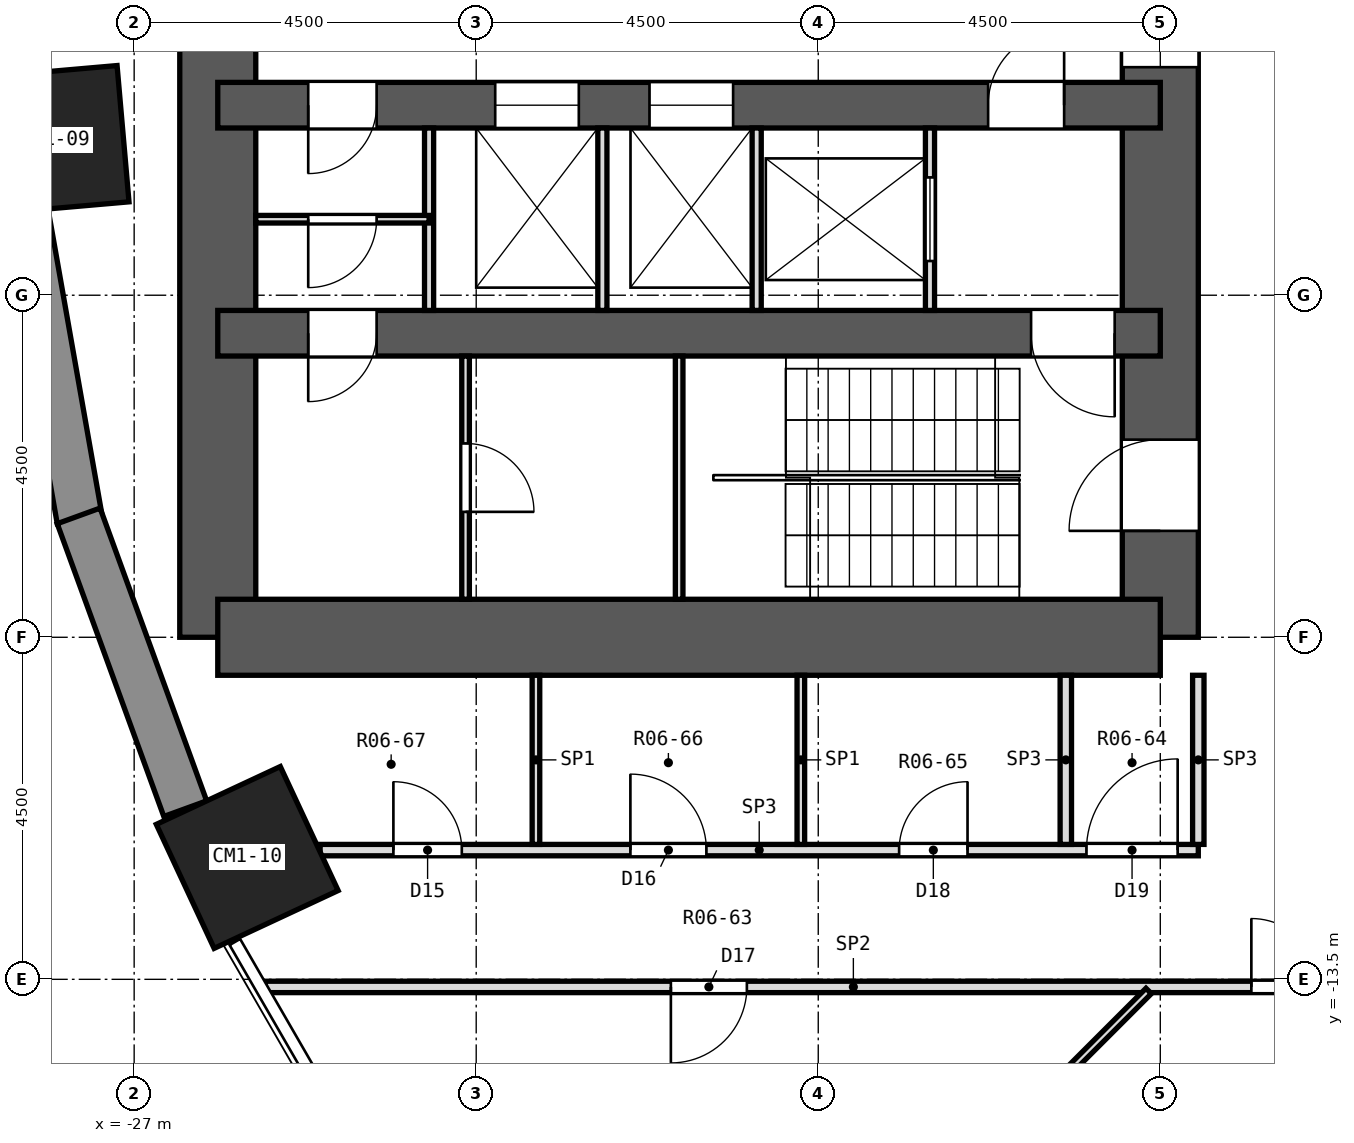
"""IFC4 building model, lengths in metres.
Left out: names, types, materials, properties, quantities, classifications, styles, units other than length and angle.
Written with IfcOpenShell. Run it as: python <this file> out.ifc"""

import sys

from ifc_helpers import new_model, si_unit, direction, frame, frame_2d, origin, origin_2d, place, context, subcontext, project, spatial, rectangle, extrude, element, fill, save


model = new_model("IFC4")
c1 = context("Model", 3, precision=1e-05, world=origin(), true_north=direction((0.0, 1.0)))
c2 = subcontext(c1, "Body", "Model", "MODEL_VIEW")
j1 = project(units=[si_unit("LENGTHUNIT", "METRE"), si_unit("PLANEANGLEUNIT", "RADIAN")], contexts=[c1])
p1 = place(None, origin())
s1 = spatial("IfcSite", under=j1, at=p1, CompositionType="ELEMENT")
p2 = place(p1, origin())
s2 = spatial("IfcBuilding", under=s1, at=p2, CompositionType="ELEMENT")
p3 = place(p2, frame((0.0, 0.0, 13.4)))
s3 = spatial("IfcBuildingStorey", under=s2, at=p3, CompositionType="ELEMENT", Elevation=13.4)
for number, where, z_axis, x_axis in (
    (1, (-28.043, -2.453, 0.0), (0.0, 0.0, 1.0), (-0.996, -0.087, 0.0)),
    (2, (-25.512, -11.897, 0.0), (0.0, 0.0, 1.0), (-0.906, -0.423, 0.0)),
):
    element("IfcColumn", number, at=place(p3, frame(where, z_axis=z_axis, x_axis=x_axis)), inside=s3, PredefinedType="COLUMN", context=c2, shape_type="SweptSolid", body=[
        extrude(rectangle(XDim=1.8, YDim=1.8, at=origin_2d()), origin(), (0.0, 0.0, 1.0), 4.2),
    ])
p4 = place(p3, frame((-13.5, -9.0, 0.0), z_axis=(0.0, 0.0, 1.0), x_axis=(0.0, 1.0, 0.0)))
e3 = element("IfcWall", 3, at=p4, inside=s3, PredefinedType="SHEAR", context=c2, shape_type="SweptSolid", body=[
    extrude(rectangle(XDim=18.0, YDim=1.0, at=frame_2d((9.0, 0.0))), origin(), (0.0, 0.0, 1.0), 4.2),
])
p5 = place(p4, frame((15.4, 0.0, 0.0)))
e4 = element("IfcOpeningElement", 4, at=p5, cuts=e3, PredefinedType="OPENING", context=c2, shape_type="SweptSolid", body=[
    extrude(rectangle(XDim=1.2, YDim=2.1, at=frame_2d((0.6, 1.05))), frame((0.0, 0.512, 0.0), z_axis=(0.0, -1.0, 0.0), x_axis=(1.0, 0.0, 0.0)), (0.0, 0.0, 1.0), 1.024),
])
p6 = place(p4, frame((1.4, 0.0, 0.0)))
e5 = element("IfcOpeningElement", 5, at=p6, cuts=e3, PredefinedType="OPENING", context=c2, shape_type="SweptSolid", body=[
    extrude(rectangle(XDim=1.2, YDim=2.1, at=frame_2d((0.6, 1.05))), frame((0.0, 0.512, 0.0), z_axis=(0.0, -1.0, 0.0), x_axis=(1.0, 0.0, 0.0)), (0.0, 0.0, 1.0), 1.024),
])
p7 = place(p4, frame((7.5, 0.0, 0.0)))
e6 = element("IfcOpeningElement", 6, at=p7, cuts=e3, PredefinedType="OPENING", context=c2, shape_type="SweptSolid", body=[
    extrude(rectangle(XDim=3.0, YDim=2.4, at=frame_2d((1.5, 1.2))), frame((0.0, 0.512, 0.0), z_axis=(0.0, -1.0, 0.0), x_axis=(1.0, 0.0, 0.0)), (0.0, 0.0, 1.0), 1.024),
])
p8 = place(p3, frame((-25.9, -9.0, 0.0), z_axis=(0.0, 0.0, 1.0), x_axis=(0.0, 1.0, 0.0)))
e7 = element("IfcWall", 7, at=p8, inside=s3, PredefinedType="SHEAR", context=c2, shape_type="SweptSolid", body=[
    extrude(rectangle(XDim=18.0, YDim=1.0, at=frame_2d((9.0, 0.0))), origin(), (0.0, 0.0, 1.0), 4.2),
])
p9 = place(p3, frame((-13.5, -9.0, 0.0), z_axis=(0.0, 0.0, 1.0), x_axis=(-1.0, 0.0, 0.0)))
e8 = element("IfcWall", 8, at=p9, inside=s3, PredefinedType="SHEAR", context=c2, shape_type="SweptSolid", body=[
    extrude(rectangle(XDim=12.4, YDim=1.0, at=frame_2d((6.2, 0.0))), origin(), (0.0, 0.0, 1.0), 4.2),
])
p10 = place(p3, frame((-13.5, -5.0, 0.0), z_axis=(0.0, 0.0, 1.0), x_axis=(-1.0, 0.0, 0.0)))
e9 = element("IfcWall", 9, at=p10, inside=s3, PredefinedType="SHEAR", context=c2, shape_type="SweptSolid", body=[
    extrude(rectangle(XDim=12.4, YDim=0.6, at=frame_2d((6.2, 0.0))), origin(), (0.0, 0.0, 1.0), 4.2),
])
p11 = place(p10, frame((10.31, 0.0, 0.0)))
e10 = element("IfcOpeningElement", 10, at=p11, cuts=e9, PredefinedType="OPENING", context=c2, shape_type="SweptSolid", body=[
    extrude(rectangle(XDim=0.9, YDim=2.1, at=frame_2d((0.45, 1.05))), frame((0.0, 0.312, 0.0), z_axis=(0.0, -1.0, 0.0), x_axis=(1.0, 0.0, 0.0)), (0.0, 0.0, 1.0), 0.624),
])
p12 = place(p10, frame((0.6, 0.0, 0.0)))
e11 = element("IfcOpeningElement", 11, at=p12, cuts=e9, PredefinedType="OPENING", context=c2, shape_type="SweptSolid", body=[
    extrude(rectangle(XDim=1.1, YDim=2.1, at=frame_2d((0.55, 1.05))), frame((0.0, 0.312, 0.0), z_axis=(0.0, -1.0, 0.0), x_axis=(1.0, 0.0, 0.0)), (0.0, 0.0, 1.0), 0.624),
])
p13 = place(p3, frame((-13.5, -2.0, 0.0), z_axis=(0.0, 0.0, 1.0), x_axis=(-1.0, 0.0, 0.0)))
e12 = element("IfcWall", 12, at=p13, inside=s3, PredefinedType="SHEAR", context=c2, shape_type="SweptSolid", body=[
    extrude(rectangle(XDim=12.4, YDim=0.6, at=frame_2d((6.2, 0.0))), origin(), (0.0, 0.0, 1.0), 4.2),
])
p14 = place(p13, frame((5.62, 0.0, 0.0)))
e13 = element("IfcOpeningElement", 13, at=p14, cuts=e12, PredefinedType="OPENING", context=c2, shape_type="SweptSolid", body=[
    extrude(rectangle(XDim=1.1, YDim=2.1, at=frame_2d((0.55, 1.05))), frame((0.0, 0.312, 0.0), z_axis=(0.0, -1.0, 0.0), x_axis=(1.0, 0.0, 0.0)), (0.0, 0.0, 1.0), 0.624),
])
p15 = place(p13, frame((7.65, 0.0, 0.0)))
e14 = element("IfcOpeningElement", 14, at=p15, cuts=e12, PredefinedType="OPENING", context=c2, shape_type="SweptSolid", body=[
    extrude(rectangle(XDim=1.1, YDim=2.1, at=frame_2d((0.55, 1.05))), frame((0.0, 0.312, 0.0), z_axis=(0.0, -1.0, 0.0), x_axis=(1.0, 0.0, 0.0)), (0.0, 0.0, 1.0), 0.624),
])
p16 = place(p13, frame((1.265, 0.0, 0.0)))
e15 = element("IfcOpeningElement", 15, at=p16, cuts=e12, PredefinedType="OPENING", context=c2, shape_type="SweptSolid", body=[
    extrude(rectangle(XDim=1.0, YDim=2.1, at=frame_2d((0.5, 1.05))), frame((0.0, 0.312, 0.0), z_axis=(0.0, -1.0, 0.0), x_axis=(1.0, 0.0, 0.0)), (0.0, 0.0, 1.0), 0.624),
])
p17 = place(p13, frame((10.31, 0.0, 0.0)))
e16 = element("IfcOpeningElement", 16, at=p17, cuts=e12, PredefinedType="OPENING", context=c2, shape_type="SweptSolid", body=[
    extrude(rectangle(XDim=0.9, YDim=2.1, at=frame_2d((0.45, 1.05))), frame((0.0, 0.312, 0.0), z_axis=(0.0, -1.0, 0.0), x_axis=(1.0, 0.0, 0.0)), (0.0, 0.0, 1.0), 0.624),
])
p18 = place(p3, frame((-28.428, -3.417, 0.0), z_axis=(0.0, 0.0, 1.0), x_axis=(0.173673210505, -0.984803338719, 0.0)))
e17 = element("IfcWall", 17, at=p18, inside=s3, PredefinedType="SOLIDWALL", context=c2, shape_type="SweptSolid", body=[
    extrude(rectangle(XDim=4.099, YDim=0.6, at=frame_2d((2.05, 0.0))), origin(), (0.0, 0.0, 1.0), 3.65),
])
p19 = place(p3, frame((-27.73, -7.403, 0.0), z_axis=(0.0, 0.0, 1.0), x_axis=(0.342034744565, -0.939687306241, 0.0)))
e18 = element("IfcWall", 18, at=p19, inside=s3, PredefinedType="SOLIDWALL", context=c2, shape_type="SweptSolid", body=[
    extrude(rectangle(XDim=4.099, YDim=0.6, at=frame_2d((2.05, 0.0))), origin(), (0.0, 0.0, 1.0), 3.65),
])
p20 = place(p3, frame((-25.276, -13.6, 0.0), z_axis=(0.0, 0.0, 1.0), x_axis=(1.0, 0.0, 0.0)))
e19 = element("IfcWall", 19, at=p20, inside=s3, PredefinedType="PARTITIONING", context=c2, shape_type="SweptSolid", body=[
    extrude(rectangle(XDim=15.476, YDim=0.15, at=frame_2d((7.738, 0.0))), origin(), (0.0, 0.0, 1.0), 3.65),
])
p21 = place(p20, frame((5.337, 0.0, 0.0)))
e20 = element("IfcOpeningElement", 20, at=p21, cuts=e19, PredefinedType="OPENING", context=c2, shape_type="SweptSolid", body=[
    extrude(rectangle(XDim=1.0, YDim=2.1, at=frame_2d((0.5, 1.05))), frame((0.0, 0.087, 0.0), z_axis=(0.0, -1.0, 0.0), x_axis=(1.0, 0.0, 0.0)), (0.0, 0.0, 1.0), 0.174),
])
p22 = place(p20, frame((12.974, 0.0, 0.0)))
e21 = element("IfcOpeningElement", 21, at=p22, cuts=e19, PredefinedType="OPENING", context=c2, shape_type="SweptSolid", body=[
    extrude(rectangle(XDim=1.8, YDim=2.1, at=frame_2d((0.9, 1.05))), frame((0.0, 0.087, 0.0), z_axis=(0.0, -1.0, 0.0), x_axis=(1.0, 0.0, 0.0)), (0.0, 0.0, 1.0), 0.174),
])
p23 = place(p3, frame((-24.554, -11.8, 0.0), z_axis=(0.0, 0.0, 1.0), x_axis=(1.0, 0.0, 0.0)))
e22 = element("IfcWall", 22, at=p23, inside=s3, PredefinedType="PARTITIONING", context=c2, shape_type="SweptSolid", body=[
    extrude(rectangle(XDim=11.554, YDim=0.15, at=frame_2d((5.777, 0.0))), origin(), (0.0, 0.0, 1.0), 3.65),
])
p24 = place(p23, frame((0.964, 0.0, 0.0)))
e23 = element("IfcOpeningElement", 23, at=p24, cuts=e22, PredefinedType="OPENING", context=c2, shape_type="SweptSolid", body=[
    extrude(rectangle(XDim=0.9, YDim=2.1, at=frame_2d((0.45, 1.05))), frame((0.0, 0.087, 0.0), z_axis=(0.0, -1.0, 0.0), x_axis=(1.0, 0.0, 0.0)), (0.0, 0.0, 1.0), 0.174),
])
p25 = place(p23, frame((4.082, 0.0, 0.0)))
e24 = element("IfcOpeningElement", 24, at=p25, cuts=e22, PredefinedType="OPENING", context=c2, shape_type="SweptSolid", body=[
    extrude(rectangle(XDim=1.0, YDim=2.1, at=frame_2d((0.5, 1.05))), frame((0.0, 0.087, 0.0), z_axis=(0.0, -1.0, 0.0), x_axis=(1.0, 0.0, 0.0)), (0.0, 0.0, 1.0), 0.174),
])
p26 = place(p23, frame((7.618, 0.0, 0.0)))
e25 = element("IfcOpeningElement", 25, at=p26, cuts=e22, PredefinedType="OPENING", context=c2, shape_type="SweptSolid", body=[
    extrude(rectangle(XDim=0.9, YDim=2.1, at=frame_2d((0.45, 1.05))), frame((0.0, 0.087, 0.0), z_axis=(0.0, -1.0, 0.0), x_axis=(1.0, 0.0, 0.0)), (0.0, 0.0, 1.0), 0.174),
])
p27 = place(p23, frame((10.082, 0.0, 0.0)))
e26 = element("IfcOpeningElement", 26, at=p27, cuts=e22, PredefinedType="OPENING", context=c2, shape_type="SweptSolid", body=[
    extrude(rectangle(XDim=1.2, YDim=2.1, at=frame_2d((0.6, 1.05))), frame((0.0, 0.087, 0.0), z_axis=(0.0, -1.0, 0.0), x_axis=(1.0, 0.0, 0.0)), (0.0, 0.0, 1.0), 0.174),
])
p28 = place(p3, frame((-19.262, -19.262, 0.0), z_axis=(0.0, 0.0, 1.0), x_axis=(0.707106781187, 0.707106781187, 0.0)))
e27 = element("IfcWall", 27, at=p28, inside=s3, PredefinedType="PARTITIONING", context=c2, shape_type="SweptSolid", body=[
    extrude(rectangle(XDim=7.932, YDim=0.1, at=frame_2d((3.966, 0.0))), origin(), (0.0, 0.0, 1.0), 3.65),
])
for number, where, z_axis, x_axis in (
    (28, (-13.0, -11.725, 0.0), (0.0, 0.0, 1.0), (0.0, 1.0, 0.0)),
    (29, (-14.743, -11.725, 0.0), (0.0, 0.0, 1.0), (0.0, 1.0, 0.0)),
):
    element("IfcWall", number, at=place(p3, frame(where, z_axis=z_axis, x_axis=x_axis)), inside=s3, PredefinedType="PARTITIONING", context=c2, shape_type="SweptSolid", body=[
        extrude(rectangle(XDim=2.225, YDim=0.15, at=frame_2d((1.113, 0.0))), origin(), (0.0, 0.0, 1.0), 3.65),
    ])
for number, where, z_axis, x_axis in (
    (30, (-18.229, -11.725, 0.0), (0.0, 0.0, 1.0), (0.0, 1.0, 0.0)),
    (31, (-21.714, -11.725, 0.0), (0.0, 0.0, 1.0), (0.0, 1.0, 0.0)),
):
    element("IfcWall", number, at=place(p3, frame(where, z_axis=z_axis, x_axis=x_axis)), inside=s3, PredefinedType="PARTITIONING", context=c2, shape_type="SweptSolid", body=[
        extrude(rectangle(XDim=2.225, YDim=0.1, at=frame_2d((1.113, 0.0))), origin(), (0.0, 0.0, 1.0), 3.65),
    ])
p29 = place(p3, frame((-16.53, -4.7, 0.0), z_axis=(0.0, 0.0, 1.0), x_axis=(0.0, 1.0, 0.0)))
e32 = element("IfcWall", 32, at=p29, inside=s3, PredefinedType="PARTITIONING", context=c2, shape_type="SweptSolid", body=[
    extrude(rectangle(XDim=2.4, YDim=0.12, at=frame_2d((1.2, 0.0))), origin(), (0.0, 0.0, 1.0), 3.65),
])
p30 = place(p29, frame((0.65, 0.0, 0.0)))
e33 = element("IfcOpeningElement", 33, at=p30, cuts=e32, PredefinedType="OPENING", context=c2, shape_type="SweptSolid", body=[
    extrude(rectangle(XDim=1.1, YDim=2.1, at=frame_2d((0.55, 1.05))), frame((0.0, 0.072, 0.0), z_axis=(0.0, -1.0, 0.0), x_axis=(1.0, 0.0, 0.0)), (0.0, 0.0, 1.0), 0.144),
])
for number, where, z_axis, x_axis in (
    (34, (-18.81, -4.7, 0.0), (0.0, 0.0, 1.0), (0.0, 1.0, 0.0)),
    (35, (-20.84, -4.7, 0.0), (0.0, 0.0, 1.0), (0.0, 1.0, 0.0)),
    (36, (-23.12, -4.7, 0.0), (0.0, 0.0, 1.0), (0.0, 1.0, 0.0)),
):
    element("IfcWall", number, at=place(p3, frame(where, z_axis=z_axis, x_axis=x_axis)), inside=s3, PredefinedType="PARTITIONING", context=c2, shape_type="SweptSolid", body=[
        extrude(rectangle(XDim=2.4, YDim=0.12, at=frame_2d((1.2, 0.0))), origin(), (0.0, 0.0, 1.0), 3.65),
    ])
p31 = place(p3, frame((-23.12, -3.5, 0.0), z_axis=(0.0, 0.0, 1.0), x_axis=(-1.0, 0.0, 0.0)))
e37 = element("IfcWall", 37, at=p31, inside=s3, PredefinedType="PARTITIONING", context=c2, shape_type="SweptSolid", body=[
    extrude(rectangle(XDim=2.28, YDim=0.1, at=frame_2d((1.14, 0.0))), origin(), (0.0, 0.0, 1.0), 3.65),
])
p32 = place(p31, frame((0.69, 0.0, 0.0)))
e38 = element("IfcOpeningElement", 38, at=p32, cuts=e37, PredefinedType="OPENING", context=c2, shape_type="SweptSolid", body=[
    extrude(rectangle(XDim=0.9, YDim=2.1, at=frame_2d((0.45, 1.05))), frame((0.0, 0.062, 0.0), z_axis=(0.0, -1.0, 0.0), x_axis=(1.0, 0.0, 0.0)), (0.0, 0.0, 1.0), 0.124),
])
p33 = place(p3, frame((-19.83, -8.5, 0.0), z_axis=(0.0, 0.0, 1.0), x_axis=(0.0, 1.0, 0.0)))
e39 = element("IfcWall", 39, at=p33, inside=s3, PredefinedType="PARTITIONING", context=c2, shape_type="SweptSolid", body=[
    extrude(rectangle(XDim=3.2, YDim=0.1, at=frame_2d((1.6, 0.0))), origin(), (0.0, 0.0, 1.0), 3.65),
])
p34 = place(p3, frame((-22.64, -8.5, 0.0), z_axis=(0.0, 0.0, 1.0), x_axis=(0.0, 1.0, 0.0)))
e40 = element("IfcWall", 40, at=p34, inside=s3, PredefinedType="PARTITIONING", context=c2, shape_type="SweptSolid", body=[
    extrude(rectangle(XDim=3.2, YDim=0.1, at=frame_2d((1.6, 0.0))), origin(), (0.0, 0.0, 1.0), 3.65),
])
p35 = place(p34, frame((1.15, 0.0, 0.0)))
e41 = element("IfcOpeningElement", 41, at=p35, cuts=e40, PredefinedType="OPENING", context=c2, shape_type="SweptSolid", body=[
    extrude(rectangle(XDim=0.9, YDim=2.1, at=frame_2d((0.45, 1.05))), frame((0.0, 0.062, 0.0), z_axis=(0.0, -1.0, 0.0), x_axis=(1.0, 0.0, 0.0)), (0.0, 0.0, 1.0), 0.124),
])
p36 = place(p24, origin())
e42 = element("IfcDoor", 42, at=p36, inside=s3, OperationType="SINGLE_SWING_LEFT", PredefinedType="DOOR", context=c2, shape_type="SweptSolid", body=[
    extrude(rectangle(XDim=0.9, YDim=2.1, at=frame_2d((0.45, 1.05))), frame((0.0, 0.025, 0.0), z_axis=(0.0, -1.0, 0.0), x_axis=(1.0, 0.0, 0.0)), (0.0, 0.0, 1.0), 0.05),
])
fill(e23, e42)
p37 = place(p25, origin())
e43 = element("IfcDoor", 43, at=p37, inside=s3, OperationType="SINGLE_SWING_LEFT", PredefinedType="DOOR", context=c2, shape_type="SweptSolid", body=[
    extrude(rectangle(XDim=1.0, YDim=2.1, at=frame_2d((0.5, 1.05))), frame((0.0, 0.025, 0.0), z_axis=(0.0, -1.0, 0.0), x_axis=(1.0, 0.0, 0.0)), (0.0, 0.0, 1.0), 0.05),
])
fill(e24, e43)
p38 = place(p21, frame((1.0, 0.0, 0.0), z_axis=(0.0, 0.0, 1.0), x_axis=(-1.0, 0.0, 0.0)))
e44 = element("IfcDoor", 44, at=p38, inside=s3, OperationType="SINGLE_SWING_RIGHT", PredefinedType="DOOR", context=c2, shape_type="SweptSolid", body=[
    extrude(rectangle(XDim=1.0, YDim=2.1, at=frame_2d((0.5, 1.05))), frame((0.0, 0.025, 0.0), z_axis=(0.0, -1.0, 0.0), x_axis=(1.0, 0.0, 0.0)), (0.0, 0.0, 1.0), 0.05),
])
fill(e20, e44)
p39 = place(p26, origin())
e45 = element("IfcDoor", 45, at=p39, inside=s3, OperationType="SINGLE_SWING_RIGHT", PredefinedType="DOOR", context=c2, shape_type="SweptSolid", body=[
    extrude(rectangle(XDim=0.9, YDim=2.1, at=frame_2d((0.45, 1.05))), frame((0.0, 0.025, 0.0), z_axis=(0.0, -1.0, 0.0), x_axis=(1.0, 0.0, 0.0)), (0.0, 0.0, 1.0), 0.05),
])
fill(e25, e45)
p40 = place(p27, origin())
e46 = element("IfcDoor", 46, at=p40, inside=s3, OperationType="SINGLE_SWING_RIGHT", PredefinedType="DOOR", context=c2, shape_type="SweptSolid", body=[
    extrude(rectangle(XDim=1.2, YDim=2.1, at=frame_2d((0.6, 1.05))), frame((0.0, 0.025, 0.0), z_axis=(0.0, -1.0, 0.0), x_axis=(1.0, 0.0, 0.0)), (0.0, 0.0, 1.0), 0.05),
])
fill(e26, e46)
p41 = place(p22, origin())
e47 = element("IfcDoor", 47, at=p41, inside=s3, OperationType="DOUBLE_DOOR_SINGLE_SWING", PredefinedType="DOOR", context=c2, shape_type="SweptSolid", body=[
    extrude(rectangle(XDim=1.8, YDim=2.1, at=frame_2d((0.9, 1.05))), frame((0.0, 0.025, 0.0), z_axis=(0.0, -1.0, 0.0), x_axis=(1.0, 0.0, 0.0)), (0.0, 0.0, 1.0), 0.05),
])
fill(e21, e47)
p42 = place(p30, origin())
e48 = element("IfcDoor", 48, at=p42, inside=s3, OperationType="DOUBLE_DOOR_SLIDING", PredefinedType="DOOR", context=c2, shape_type="SweptSolid", body=[
    extrude(rectangle(XDim=1.1, YDim=2.1, at=frame_2d((0.55, 1.05))), frame((0.0, 0.025, 0.0), z_axis=(0.0, -1.0, 0.0), x_axis=(1.0, 0.0, 0.0)), (0.0, 0.0, 1.0), 0.05),
])
fill(e33, e48)
p43 = place(p14, origin())
e49 = element("IfcDoor", 49, at=p43, inside=s3, OperationType="DOUBLE_DOOR_SLIDING", PredefinedType="DOOR", context=c2, shape_type="SweptSolid", body=[
    extrude(rectangle(XDim=1.1, YDim=2.1, at=frame_2d((0.55, 1.05))), frame((0.0, 0.025, 0.0), z_axis=(0.0, -1.0, 0.0), x_axis=(1.0, 0.0, 0.0)), (0.0, 0.0, 1.0), 0.05),
])
fill(e13, e49)
p44 = place(p15, origin())
e50 = element("IfcDoor", 50, at=p44, inside=s3, OperationType="DOUBLE_DOOR_SLIDING", PredefinedType="DOOR", context=c2, shape_type="SweptSolid", body=[
    extrude(rectangle(XDim=1.1, YDim=2.1, at=frame_2d((0.55, 1.05))), frame((0.0, 0.025, 0.0), z_axis=(0.0, -1.0, 0.0), x_axis=(1.0, 0.0, 0.0)), (0.0, 0.0, 1.0), 0.05),
])
fill(e14, e50)
p45 = place(p16, frame((1.0, 0.0, 0.0), z_axis=(0.0, 0.0, 1.0), x_axis=(-1.0, 0.0, 0.0)))
e51 = element("IfcDoor", 51, at=p45, inside=s3, OperationType="SINGLE_SWING_RIGHT", PredefinedType="DOOR", context=c2, shape_type="SweptSolid", body=[
    extrude(rectangle(XDim=1.0, YDim=2.1, at=frame_2d((0.5, 1.05))), frame((0.0, 0.025, 0.0), z_axis=(0.0, -1.0, 0.0), x_axis=(1.0, 0.0, 0.0)), (0.0, 0.0, 1.0), 0.05),
])
fill(e15, e51)
p46 = place(p17, origin())
e52 = element("IfcDoor", 52, at=p46, inside=s3, OperationType="SINGLE_SWING_RIGHT", PredefinedType="DOOR", context=c2, shape_type="SweptSolid", body=[
    extrude(rectangle(XDim=0.9, YDim=2.1, at=frame_2d((0.45, 1.05))), frame((0.0, 0.025, 0.0), z_axis=(0.0, -1.0, 0.0), x_axis=(1.0, 0.0, 0.0)), (0.0, 0.0, 1.0), 0.05),
])
fill(e16, e52)
p47 = place(p32, origin())
e53 = element("IfcDoor", 53, at=p47, inside=s3, OperationType="SINGLE_SWING_RIGHT", PredefinedType="DOOR", context=c2, shape_type="SweptSolid", body=[
    extrude(rectangle(XDim=0.9, YDim=2.1, at=frame_2d((0.45, 1.05))), frame((0.0, 0.025, 0.0), z_axis=(0.0, -1.0, 0.0), x_axis=(1.0, 0.0, 0.0)), (0.0, 0.0, 1.0), 0.05),
])
fill(e38, e53)
p48 = place(p35, frame((0.9, 0.0, 0.0), z_axis=(0.0, 0.0, 1.0), x_axis=(-1.0, 0.0, 0.0)))
e54 = element("IfcDoor", 54, at=p48, inside=s3, OperationType="SINGLE_SWING_RIGHT", PredefinedType="DOOR", context=c2, shape_type="SweptSolid", body=[
    extrude(rectangle(XDim=0.9, YDim=2.1, at=frame_2d((0.45, 1.05))), frame((0.0, 0.025, 0.0), z_axis=(0.0, -1.0, 0.0), x_axis=(1.0, 0.0, 0.0)), (0.0, 0.0, 1.0), 0.05),
])
fill(e41, e54)
p49 = place(p11, origin())
e55 = element("IfcDoor", 55, at=p49, inside=s3, OperationType="SINGLE_SWING_RIGHT", PredefinedType="DOOR", context=c2, shape_type="SweptSolid", body=[
    extrude(rectangle(XDim=0.9, YDim=2.1, at=frame_2d((0.45, 1.05))), frame((0.0, 0.025, 0.0), z_axis=(0.0, -1.0, 0.0), x_axis=(1.0, 0.0, 0.0)), (0.0, 0.0, 1.0), 0.05),
])
fill(e10, e55)
p50 = place(p12, origin())
e56 = element("IfcDoor", 56, at=p50, inside=s3, OperationType="SINGLE_SWING_LEFT", PredefinedType="DOOR", context=c2, shape_type="SweptSolid", body=[
    extrude(rectangle(XDim=1.1, YDim=2.1, at=frame_2d((0.55, 1.05))), frame((0.0, 0.025, 0.0), z_axis=(0.0, -1.0, 0.0), x_axis=(1.0, 0.0, 0.0)), (0.0, 0.0, 1.0), 0.05),
])
fill(e11, e56)
p51 = place(p6, origin())
e57 = element("IfcDoor", 57, at=p51, inside=s3, OperationType="SINGLE_SWING_LEFT", PredefinedType="DOOR", context=c2, shape_type="SweptSolid", body=[
    extrude(rectangle(XDim=1.2, YDim=2.1, at=frame_2d((0.6, 1.05))), frame((0.0, 0.025, 0.0), z_axis=(0.0, -1.0, 0.0), x_axis=(1.0, 0.0, 0.0)), (0.0, 0.0, 1.0), 0.05),
])
fill(e5, e57)
p52 = place(p7, origin())
e58 = element("IfcDoor", 58, at=p52, inside=s3, OperationType="DOUBLE_DOOR_SLIDING", PredefinedType="DOOR", context=c2, shape_type="SweptSolid", body=[
    extrude(rectangle(XDim=3.0, YDim=2.4, at=frame_2d((1.5, 1.2))), frame((0.0, 0.025, 0.0), z_axis=(0.0, -1.0, 0.0), x_axis=(1.0, 0.0, 0.0)), (0.0, 0.0, 1.0), 0.05),
])
fill(e6, e58)
save(model, sys.argv[1])
